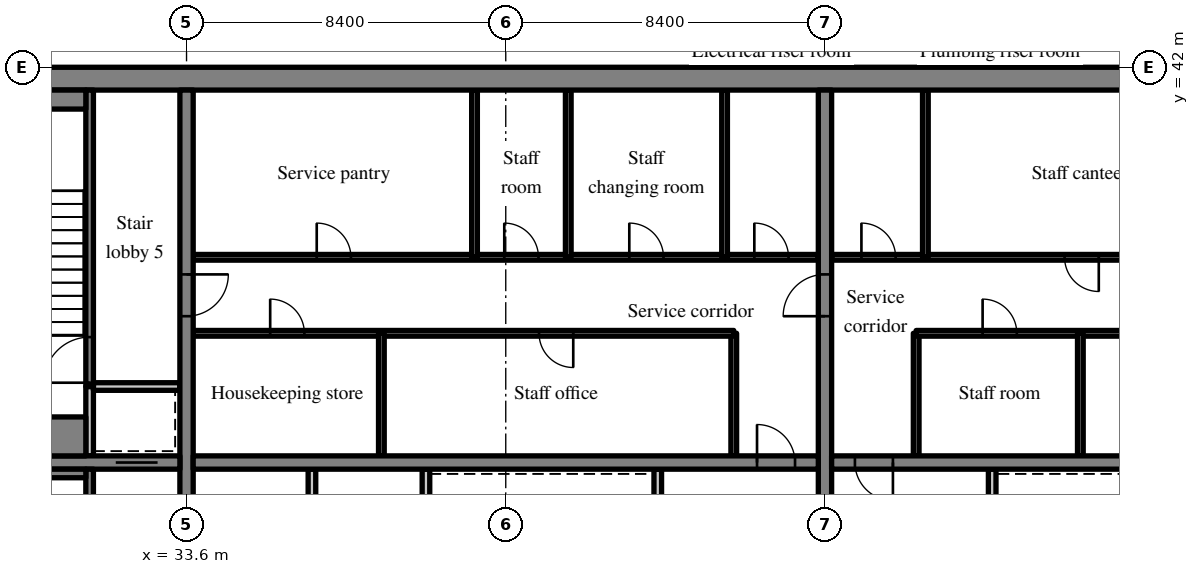
"""IFC4 building model, lengths in metres.
Left out: names, types, materials, properties, quantities, classifications, styles, units other than length and angle.
Written with IfcOpenShell. Run it as: python <this file> out.ifc"""

import sys

from ifc_helpers import new_model, si_unit, direction, frame, frame_2d, origin, place, context, subcontext, project, spatial, rectangle, extrude, source, transform, mapped, element, fill, save


model = new_model("IFC4")
c1 = context("Model", 3, precision=1e-05, world=origin(), true_north=direction((0.0, 1.0)))
c2 = subcontext(c1, "Body", "Model", "MODEL_VIEW")
j1 = project(units=[si_unit("LENGTHUNIT", "METRE"), si_unit("PLANEANGLEUNIT", "RADIAN")], contexts=[c1])
p1 = place(None, origin())
s1 = spatial("IfcSite", under=j1, at=p1, CompositionType="ELEMENT")
p2 = place(p1, origin())
s2 = spatial("IfcBuilding", under=s1, at=p2, CompositionType="ELEMENT")
p3 = place(p2, frame((0.0, 0.0, 260.8)))
s3 = spatial("IfcBuildingStorey", under=s2, at=p3, CompositionType="ELEMENT", Elevation=260.8)
m1 = source(origin(), c2, "Body", "SweptSolid", [
    extrude(rectangle(XDim=50.4, YDim=0.6, at=frame_2d((25.2, 0.0))), origin(), (0.0, 0.0, 1.0), 3.62),
])
p4 = place(p3, frame((25.2, 41.7, 0.0), z_axis=(0.0, 0.0, 1.0), x_axis=(1.0, 0.0, 0.0)))
e1 = element("IfcWall", 1, at=p4, inside=s3, PredefinedType="SHEAR", context=c2, shape_type="MappedRepresentation", body=[
    mapped(m1, transform((0.0, 0.0, 0.0), scale=1.0)),
])
m2 = source(origin(), c2, "Body", "SweptSolid", [
    extrude(rectangle(XDim=18.8, YDim=0.35, at=frame_2d((9.4, 0.0))), origin(), (0.0, 0.0, 1.0), 3.62),
])
p5 = place(p3, frame((33.6, 22.6, 0.0), z_axis=(0.0, 0.0, 1.0), x_axis=(0.0, 1.0, 0.0)))
e2 = element("IfcWall", 2, at=p5, inside=s3, PredefinedType="SHEAR", context=c2, shape_type="MappedRepresentation", body=[
    mapped(m2, transform((0.0, 0.0, 0.0), scale=1.0)),
])
m3 = source(origin(), c2, "Body", "SweptSolid", [
    extrude(rectangle(XDim=1.1, YDim=2.1, at=frame_2d((0.55, 1.05))), frame((0.0, 0.185, 0.0), z_axis=(0.0, -1.0, 0.0), x_axis=(1.0, 0.0, 0.0)), (0.0, 0.0, 1.0), 0.37),
])
p6 = place(p5, frame((12.85, 0.0, 0.0)))
e3 = element("IfcOpeningElement", 3, at=p6, cuts=e2, PredefinedType="OPENING", context=c2, shape_type="MappedRepresentation", body=[
    mapped(m3, transform((0.0, 0.0, 0.0), scale=1.0)),
])
p7 = place(p3, frame((50.4, 22.6, 0.0), z_axis=(0.0, 0.0, 1.0), x_axis=(0.0, 1.0, 0.0)))
e4 = element("IfcWall", 4, at=p7, inside=s3, PredefinedType="SHEAR", context=c2, shape_type="MappedRepresentation", body=[
    mapped(m2, transform((0.0, 0.0, 0.0), scale=1.0)),
])
p8 = place(p7, frame((12.85, 0.0, 0.0)))
e5 = element("IfcOpeningElement", 5, at=p8, cuts=e4, PredefinedType="OPENING", context=c2, shape_type="MappedRepresentation", body=[
    mapped(m3, transform((0.0, 0.0, 0.0), scale=1.0)),
])
m4 = source(origin(), c2, "Body", "SweptSolid", [
    extrude(rectangle(XDim=7.625, YDim=0.35, at=frame_2d((3.812, 0.0))), origin(), (0.0, 0.0, 1.0), 3.62),
])
p9 = place(p3, frame((25.8, 31.6, 0.0), z_axis=(0.0, 0.0, 1.0), x_axis=(1.0, 0.0, 0.0)))
e6 = element("IfcWall", 6, at=p9, inside=s3, PredefinedType="SHEAR", context=c2, shape_type="MappedRepresentation", body=[
    mapped(m4, transform((0.0, 0.0, 0.0), scale=1.0)),
])
p10 = place(p9, frame((5.938, 0.0, 0.0)))
e7 = element("IfcOpeningElement", 7, at=p10, cuts=e6, PredefinedType="OPENING", context=c2, shape_type="MappedRepresentation", body=[
    mapped(m3, transform((0.0, 0.0, 0.0), scale=1.0)),
])
m5 = source(origin(), c2, "Body", "SweptSolid", [
    extrude(rectangle(XDim=16.45, YDim=0.35, at=frame_2d((8.225, 0.0))), origin(), (0.0, 0.0, 1.0), 3.62),
])
p11 = place(p3, frame((33.775, 31.6, 0.0), z_axis=(0.0, 0.0, 1.0), x_axis=(1.0, 0.0, 0.0)))
e8 = element("IfcWall", 8, at=p11, inside=s3, PredefinedType="SHEAR", context=c2, shape_type="MappedRepresentation", body=[
    mapped(m5, transform((0.0, 0.0, 0.0), scale=1.0)),
])
m6 = source(origin(), c2, "Body", "SweptSolid", [
    extrude(rectangle(XDim=1.0, YDim=2.1, at=frame_2d((0.5, 1.05))), frame((0.0, 0.185, 0.0), z_axis=(0.0, -1.0, 0.0), x_axis=(1.0, 0.0, 0.0)), (0.0, 0.0, 1.0), 0.37),
])
p12 = place(p11, frame((14.837, 0.0, 0.0)))
e9 = element("IfcOpeningElement", 9, at=p12, cuts=e8, PredefinedType="OPENING", context=c2, shape_type="MappedRepresentation", body=[
    mapped(m6, transform((0.0, 0.0, 0.0), scale=1.0)),
])
m7 = source(origin(), c2, "Body", "SweptSolid", [
    extrude(rectangle(XDim=16.45, YDim=0.35, at=frame_2d((8.225, 0.0))), origin(), (0.0, 0.0, 1.0), 3.62),
])
p13 = place(p3, frame((50.575, 31.6, 0.0), z_axis=(0.0, 0.0, 1.0), x_axis=(1.0, 0.0, 0.0)))
e10 = element("IfcWall", 10, at=p13, inside=s3, PredefinedType="SHEAR", context=c2, shape_type="MappedRepresentation", body=[
    mapped(m7, transform((0.0, 0.0, 0.0), scale=1.0)),
])
p14 = place(p13, frame((0.613, 0.0, 0.0)))
e11 = element("IfcOpeningElement", 11, at=p14, cuts=e10, PredefinedType="OPENING", context=c2, shape_type="MappedRepresentation", body=[
    mapped(m6, transform((0.0, 0.0, 0.0), scale=1.0)),
])
m8 = source(origin(), c2, "Body", "SweptSolid", [
    extrude(rectangle(XDim=8.825, YDim=0.2, at=frame_2d((4.413, 0.0))), origin(), (0.0, 0.0, 1.0), 3.62),
])
p15 = place(p3, frame((39.9, 22.6, 0.0), z_axis=(0.0, 0.0, 1.0), x_axis=(0.0, 1.0, 0.0)))
e12 = element("IfcWall", 12, at=p15, inside=s3, PredefinedType="PARTITIONING", context=c2, shape_type="MappedRepresentation", body=[
    mapped(m8, transform((0.0, 0.0, 0.0), scale=1.0)),
])
m9 = source(origin(), c2, "Body", "SweptSolid", [
    extrude(rectangle(XDim=0.9, YDim=2.1, at=frame_2d((0.45, 1.05))), frame((0.0, 0.11, 0.0), z_axis=(0.0, -1.0, 0.0), x_axis=(1.0, 0.0, 0.0)), (0.0, 0.0, 1.0), 0.22),
])
p16 = place(p15, frame((3.95, 0.0, 0.0)))
e13 = element("IfcOpeningElement", 13, at=p16, cuts=e12, PredefinedType="OPENING", context=c2, shape_type="MappedRepresentation", body=[
    mapped(m9, transform((0.0, 0.0, 0.0), scale=1.0)),
])
m10 = source(origin(), c2, "Body", "SweptSolid", [
    extrude(rectangle(XDim=2.625, YDim=0.2, at=frame_2d((1.312, 0.0))), origin(), (0.0, 0.0, 1.0), 3.62),
])
p17 = place(p3, frame((46.0, 28.8, 0.0), z_axis=(0.0, 0.0, 1.0), x_axis=(0.0, 1.0, 0.0)))
e14 = element("IfcWall", 14, at=p17, inside=s3, PredefinedType="SOLIDWALL", context=c2, shape_type="MappedRepresentation", body=[
    mapped(m10, transform((0.0, 0.0, 0.0), scale=1.0)),
])
p18 = place(p3, frame((36.9, 22.6, 0.0), z_axis=(0.0, 0.0, 1.0), x_axis=(0.0, 1.0, 0.0)))
e15 = element("IfcWall", 15, at=p18, inside=s3, PredefinedType="PARTITIONING", context=c2, shape_type="MappedRepresentation", body=[
    mapped(m8, transform((0.0, 0.0, 0.0), scale=1.0)),
])
m11 = source(origin(), c2, "Body", "SweptSolid", [
    extrude(rectangle(XDim=3.225, YDim=0.15, at=frame_2d((1.613, 0.0))), origin(), (0.0, 0.0, 1.0), 3.62),
])
p19 = place(p3, frame((48.0, 31.775, 0.0), z_axis=(0.0, 0.0, 1.0), x_axis=(0.0, 1.0, 0.0)))
e16 = element("IfcWall", 16, at=p19, inside=s3, PredefinedType="PARTITIONING", context=c2, shape_type="MappedRepresentation", body=[
    mapped(m11, transform((0.0, 0.0, 0.0), scale=1.0)),
])
m12 = source(origin(), c2, "Body", "SweptSolid", [
    extrude(rectangle(XDim=14.225, YDim=0.15, at=frame_2d((7.113, 0.0))), origin(), (0.0, 0.0, 1.0), 3.62),
])
p20 = place(p3, frame((33.775, 35.0, 0.0), z_axis=(0.0, 0.0, 1.0), x_axis=(1.0, 0.0, 0.0)))
e17 = element("IfcWall", 17, at=p20, inside=s3, PredefinedType="PARTITIONING", context=c2, shape_type="MappedRepresentation", body=[
    mapped(m12, transform((0.0, 0.0, 0.0), scale=1.0)),
])
m13 = source(origin(), c2, "Body", "SweptSolid", [
    extrude(rectangle(XDim=0.9, YDim=2.1, at=frame_2d((0.45, 1.05))), frame((0.0, 0.085, 0.0), z_axis=(0.0, -1.0, 0.0), x_axis=(1.0, 0.0, 0.0)), (0.0, 0.0, 1.0), 0.17),
])
p21 = place(p20, frame((2.026, 0.0, 0.0)))
e18 = element("IfcOpeningElement", 18, at=p21, cuts=e17, PredefinedType="OPENING", context=c2, shape_type="MappedRepresentation", body=[
    mapped(m13, transform((0.0, 0.0, 0.0), scale=1.0)),
])
p22 = place(p20, frame((9.101, 0.0, 0.0)))
e19 = element("IfcOpeningElement", 19, at=p22, cuts=e17, PredefinedType="OPENING", context=c2, shape_type="MappedRepresentation", body=[
    mapped(m13, transform((0.0, 0.0, 0.0), scale=1.0)),
])
m14 = source(origin(), c2, "Body", "SweptSolid", [
    extrude(rectangle(XDim=16.45, YDim=0.15, at=frame_2d((8.225, 0.0))), origin(), (0.0, 0.0, 1.0), 3.62),
])
p23 = place(p3, frame((33.775, 37.0, 0.0), z_axis=(0.0, 0.0, 1.0), x_axis=(1.0, 0.0, 0.0)))
e20 = element("IfcWall", 20, at=p23, inside=s3, PredefinedType="PARTITIONING", context=c2, shape_type="MappedRepresentation", body=[
    mapped(m14, transform((0.0, 0.0, 0.0), scale=1.0)),
])
p24 = place(p23, frame((3.251, 0.0, 0.0)))
e21 = element("IfcOpeningElement", 21, at=p24, cuts=e20, PredefinedType="OPENING", context=c2, shape_type="MappedRepresentation", body=[
    mapped(m13, transform((0.0, 0.0, 0.0), scale=1.0)),
])
p25 = place(p23, frame((8.186, 0.0, 0.0)))
e22 = element("IfcOpeningElement", 22, at=p25, cuts=e20, PredefinedType="OPENING", context=c2, shape_type="MappedRepresentation", body=[
    mapped(m13, transform((0.0, 0.0, 0.0), scale=1.0)),
])
p26 = place(p23, frame((11.476, 0.0, 0.0)))
e23 = element("IfcOpeningElement", 23, at=p26, cuts=e20, PredefinedType="OPENING", context=c2, shape_type="MappedRepresentation", body=[
    mapped(m13, transform((0.0, 0.0, 0.0), scale=1.0)),
])
p27 = place(p23, frame((14.766, 0.0, 0.0)))
e24 = element("IfcOpeningElement", 24, at=p27, cuts=e20, PredefinedType="OPENING", context=c2, shape_type="MappedRepresentation", body=[
    mapped(m13, transform((0.0, 0.0, 0.0), scale=1.0)),
])
p28 = place(p3, frame((38.727, 31.775, 0.0), z_axis=(0.0, 0.0, 1.0), x_axis=(0.0, 1.0, 0.0)))
e25 = element("IfcWall", 25, at=p28, inside=s3, PredefinedType="PARTITIONING", context=c2, shape_type="MappedRepresentation", body=[
    mapped(m11, transform((0.0, 0.0, 0.0), scale=1.0)),
])
m15 = source(origin(), c2, "Body", "SweptSolid", [
    extrude(rectangle(XDim=4.4, YDim=0.15, at=frame_2d((2.2, 0.0))), origin(), (0.0, 0.0, 1.0), 3.62),
])
for number, where, z_axis, x_axis in (
    (26, (41.178, 37.0, 0.0), (0.0, 0.0, 1.0), (0.0, 1.0, 0.0)),
    (27, (43.645, 37.0, 0.0), (0.0, 0.0, 1.0), (0.0, 1.0, 0.0)),
    (28, (47.758, 37.0, 0.0), (0.0, 0.0, 1.0), (0.0, 1.0, 0.0)),
):
    element("IfcWall", number, at=place(p3, frame(where, z_axis=z_axis, x_axis=x_axis)), inside=s3, PredefinedType="PARTITIONING", context=c2, shape_type="MappedRepresentation", body=[
        mapped(m15, transform((0.0, 0.0, 0.0), scale=1.0)),
    ])
p29 = place(p3, frame((54.8, 28.8, 0.0), z_axis=(0.0, 0.0, 1.0), x_axis=(0.0, 1.0, 0.0)))
e29 = element("IfcWall", 29, at=p29, inside=s3, PredefinedType="SOLIDWALL", context=c2, shape_type="MappedRepresentation", body=[
    mapped(m10, transform((0.0, 0.0, 0.0), scale=1.0)),
])
p30 = place(p3, frame((52.8, 31.775, 0.0), z_axis=(0.0, 0.0, 1.0), x_axis=(0.0, 1.0, 0.0)))
e30 = element("IfcWall", 30, at=p30, inside=s3, PredefinedType="PARTITIONING", context=c2, shape_type="MappedRepresentation", body=[
    mapped(m11, transform((0.0, 0.0, 0.0), scale=1.0)),
])
m16 = source(origin(), c2, "Body", "SweptSolid", [
    extrude(rectangle(XDim=14.225, YDim=0.15, at=frame_2d((7.112, 0.0))), origin(), (0.0, 0.0, 1.0), 3.62),
])
p31 = place(p3, frame((67.025, 35.0, 0.0), z_axis=(0.0, 0.0, 1.0), x_axis=(-1.0, 0.0, 0.0)))
e31 = element("IfcWall", 31, at=p31, inside=s3, PredefinedType="PARTITIONING", context=c2, shape_type="MappedRepresentation", body=[
    mapped(m16, transform((0.0, 0.0, 0.0), scale=1.0)),
])
p32 = place(p31, frame((0.965, 0.0, 0.0)))
e32 = element("IfcOpeningElement", 32, at=p32, cuts=e31, PredefinedType="OPENING", context=c2, shape_type="MappedRepresentation", body=[
    mapped(m13, transform((0.0, 0.0, 0.0), scale=1.0)),
])
p33 = place(p31, frame((5.918, 0.0, 0.0)))
e33 = element("IfcOpeningElement", 33, at=p33, cuts=e31, PredefinedType="OPENING", context=c2, shape_type="MappedRepresentation", body=[
    mapped(m13, transform((0.0, 0.0, 0.0), scale=1.0)),
])
p34 = place(p31, frame((11.577, 0.0, 0.0)))
e34 = element("IfcOpeningElement", 34, at=p34, cuts=e31, PredefinedType="OPENING", context=c2, shape_type="MappedRepresentation", body=[
    mapped(m13, transform((0.0, 0.0, 0.0), scale=1.0)),
])
m17 = source(origin(), c2, "Body", "SweptSolid", [
    extrude(rectangle(XDim=16.45, YDim=0.15, at=frame_2d((8.225, 0.0))), origin(), (0.0, 0.0, 1.0), 3.62),
])
p35 = place(p3, frame((67.025, 37.0, 0.0), z_axis=(0.0, 0.0, 1.0), x_axis=(-1.0, 0.0, 0.0)))
e35 = element("IfcWall", 35, at=p35, inside=s3, PredefinedType="PARTITIONING", context=c2, shape_type="MappedRepresentation", body=[
    mapped(m17, transform((0.0, 0.0, 0.0), scale=1.0)),
])
p36 = place(p35, frame((0.784, 0.0, 0.0)))
e36 = element("IfcOpeningElement", 36, at=p36, cuts=e35, PredefinedType="OPENING", context=c2, shape_type="MappedRepresentation", body=[
    mapped(m13, transform((0.0, 0.0, 0.0), scale=1.0)),
])
p37 = place(p35, frame((3.663, 0.0, 0.0)))
e37 = element("IfcOpeningElement", 37, at=p37, cuts=e35, PredefinedType="OPENING", context=c2, shape_type="MappedRepresentation", body=[
    mapped(m13, transform((0.0, 0.0, 0.0), scale=1.0)),
])
p38 = place(p35, frame((9.42, 0.0, 0.0)))
e38 = element("IfcOpeningElement", 38, at=p38, cuts=e35, PredefinedType="OPENING", context=c2, shape_type="MappedRepresentation", body=[
    mapped(m13, transform((0.0, 0.0, 0.0), scale=1.0)),
])
p39 = place(p35, frame((14.766, 0.0, 0.0)))
e39 = element("IfcOpeningElement", 39, at=p39, cuts=e35, PredefinedType="OPENING", context=c2, shape_type="MappedRepresentation", body=[
    mapped(m13, transform((0.0, 0.0, 0.0), scale=1.0)),
])
p40 = place(p3, frame((57.12, 31.775, 0.0), z_axis=(0.0, 0.0, 1.0), x_axis=(0.0, 1.0, 0.0)))
e40 = element("IfcWall", 40, at=p40, inside=s3, PredefinedType="PARTITIONING", context=c2, shape_type="MappedRepresentation", body=[
    mapped(m11, transform((0.0, 0.0, 0.0), scale=1.0)),
])
p41 = place(p3, frame((53.042, 37.0, 0.0), z_axis=(0.0, 0.0, 1.0), x_axis=(0.0, 1.0, 0.0)))
e41 = element("IfcWall", 41, at=p41, inside=s3, PredefinedType="PARTITIONING", context=c2, shape_type="MappedRepresentation", body=[
    mapped(m15, transform((0.0, 0.0, 0.0), scale=1.0)),
])
m18 = source(origin(), c2, "Body", "SweptSolid", [
    extrude(rectangle(XDim=8.825, YDim=0.2, at=frame_2d((4.413, 0.0))), origin(), (0.0, 0.0, 1.0), 3.62),
])
p42 = place(p3, frame((31.05, 22.6, 0.0), z_axis=(0.0, 0.0, 1.0), x_axis=(0.0, 1.0, 0.0)))
e42 = element("IfcWall", 42, at=p42, inside=s3, PredefinedType="SOLIDWALL", context=c2, shape_type="MappedRepresentation", body=[
    mapped(m18, transform((0.0, 0.0, 0.0), scale=1.0)),
])
m19 = source(origin(), c2, "Body", "SweptSolid", [
    extrude(rectangle(XDim=1.2, YDim=2.1, at=frame_2d((0.6, 1.05))), frame((0.0, 0.11, 0.0), z_axis=(0.0, -1.0, 0.0), x_axis=(1.0, 0.0, 0.0)), (0.0, 0.0, 1.0), 0.22),
])
p43 = place(p42, frame((1.0, 0.0, 0.0)))
e43 = element("IfcOpeningElement", 43, at=p43, cuts=e42, PredefinedType="OPENING", context=c2, shape_type="MappedRepresentation", body=[
    mapped(m19, transform((0.0, 0.0, 0.0), scale=1.0)),
])
m20 = source(origin(), c2, "Body", "SweptSolid", [
    extrude(rectangle(XDim=1.825, YDim=0.2, at=frame_2d((0.913, 0.0))), origin(), (0.0, 0.0, 1.0), 3.62),
])
p44 = place(p3, frame((31.05, 31.775, 0.0), z_axis=(0.0, 0.0, 1.0), x_axis=(0.0, 1.0, 0.0)))
e44 = element("IfcWall", 44, at=p44, inside=s3, PredefinedType="SOLIDWALL", context=c2, shape_type="MappedRepresentation", body=[
    mapped(m20, transform((0.0, 0.0, 0.0), scale=1.0)),
])
m21 = source(origin(), c2, "Body", "SweptSolid", [
    extrude(rectangle(XDim=2.275, YDim=0.2, at=frame_2d((1.138, 0.0))), origin(), (0.0, 0.0, 1.0), 3.62),
])
p45 = place(p3, frame((31.15, 33.6, 0.0), z_axis=(0.0, 0.0, 1.0), x_axis=(1.0, 0.0, 0.0)))
e45 = element("IfcWall", 45, at=p45, inside=s3, PredefinedType="SOLIDWALL", context=c2, shape_type="MappedRepresentation", body=[
    mapped(m21, transform((0.0, 0.0, 0.0), scale=1.0)),
])
m22 = source(origin(), c2, "Body", "SweptSolid", [
    extrude(rectangle(XDim=7.8, YDim=0.2, at=frame_2d((3.9, 0.0))), origin(), (0.0, 0.0, 1.0), 3.62),
])
p46 = place(p3, frame((31.05, 33.6, 0.0), z_axis=(0.0, 0.0, 1.0), x_axis=(0.0, 1.0, 0.0)))
e46 = element("IfcWall", 46, at=p46, inside=s3, PredefinedType="SOLIDWALL", context=c2, shape_type="MappedRepresentation", body=[
    mapped(m22, transform((0.0, 0.0, 0.0), scale=1.0)),
])
p47 = place(p46, frame((0.1, 0.0, 0.0)))
e47 = element("IfcOpeningElement", 47, at=p47, cuts=e46, PredefinedType="OPENING", context=c2, shape_type="MappedRepresentation", body=[
    mapped(m19, transform((0.0, 0.0, 0.0), scale=1.0)),
])
m23 = source(origin(), c2, "Body", "SweptSolid", [
    extrude(rectangle(XDim=5.15, YDim=0.225, at=frame_2d((2.575, 0.0))), origin(), (0.0, 0.0, 1.0), 3.62),
])
p48 = place(p3, frame((25.8, 31.312, 0.0), z_axis=(0.0, 0.0, 1.0), x_axis=(1.0, 0.0, 0.0)))
e48 = element("IfcWall", 48, at=p48, inside=s3, PredefinedType="SOLIDWALL", context=c2, shape_type="MappedRepresentation", body=[
    mapped(m23, transform((0.0, 0.0, 0.0), scale=1.0)),
])
m24 = source(origin(), c2, "Body", "SweptSolid", [
    extrude(rectangle(XDim=5.15, YDim=0.5, at=frame_2d((2.575, 0.0))), origin(), (0.0, 0.0, 1.0), 3.62),
])
p49 = place(p3, frame((25.8, 41.15, 0.0), z_axis=(0.0, 0.0, 1.0), x_axis=(1.0, 0.0, 0.0)))
e49 = element("IfcWall", 49, at=p49, inside=s3, PredefinedType="SOLIDWALL", context=c2, shape_type="MappedRepresentation", body=[
    mapped(m24, transform((0.0, 0.0, 0.0), scale=1.0)),
])
m25 = source(origin(), c2, "Body", "SweptSolid", [
    extrude(rectangle(XDim=5.15, YDim=1.025, at=frame_2d((2.575, 0.0))), origin(), (0.0, 0.0, 1.0), 3.62),
])
p50 = place(p3, frame((25.8, 32.287, 0.0), z_axis=(0.0, 0.0, 1.0), x_axis=(1.0, 0.0, 0.0)))
e50 = element("IfcWall", 50, at=p50, inside=s3, PredefinedType="SOLIDWALL", context=c2, shape_type="MappedRepresentation", body=[
    mapped(m25, transform((0.0, 0.0, 0.0), scale=1.0)),
])
m26 = source(origin(), c2, "Body", "SweptSolid", [
    extrude(rectangle(XDim=1.0, YDim=2.1, at=frame_2d((0.5, 1.05))), frame((0.0, 0.025, 0.0), z_axis=(0.0, -1.0, 0.0), x_axis=(1.0, 0.0, 0.0)), (0.0, 0.0, 1.0), 0.05),
])
p51 = place(p12, origin())
e51 = element("IfcDoor", 51, at=p51, inside=s3, OperationType="SINGLE_SWING_LEFT", PredefinedType="DOOR", context=c2, shape_type="MappedRepresentation", body=[
    mapped(m26, transform((0.0, 0.0, 0.0), scale=1.0)),
])
fill(e9, e51)
m27 = source(origin(), c2, "Body", "SweptSolid", [
    extrude(rectangle(XDim=0.9, YDim=2.1, at=frame_2d((0.45, 1.05))), frame((0.0, 0.025, 0.0), z_axis=(0.0, -1.0, 0.0), x_axis=(1.0, 0.0, 0.0)), (0.0, 0.0, 1.0), 0.05),
])
p52 = place(p21, origin())
e52 = element("IfcDoor", 52, at=p52, inside=s3, OperationType="SINGLE_SWING_LEFT", PredefinedType="DOOR", context=c2, shape_type="MappedRepresentation", body=[
    mapped(m27, transform((0.0, 0.0, 0.0), scale=1.0)),
])
fill(e18, e52)
p53 = place(p22, origin())
e53 = element("IfcDoor", 53, at=p53, inside=s3, OperationType="SINGLE_SWING_RIGHT", PredefinedType="DOOR", context=c2, shape_type="MappedRepresentation", body=[
    mapped(m27, transform((0.0, 0.0, 0.0), scale=1.0)),
])
fill(e19, e53)
p54 = place(p24, origin())
e54 = element("IfcDoor", 54, at=p54, inside=s3, OperationType="SINGLE_SWING_LEFT", PredefinedType="DOOR", context=c2, shape_type="MappedRepresentation", body=[
    mapped(m27, transform((0.0, 0.0, 0.0), scale=1.0)),
])
fill(e21, e54)
p55 = place(p25, origin())
e55 = element("IfcDoor", 55, at=p55, inside=s3, OperationType="SINGLE_SWING_LEFT", PredefinedType="DOOR", context=c2, shape_type="MappedRepresentation", body=[
    mapped(m27, transform((0.0, 0.0, 0.0), scale=1.0)),
])
fill(e22, e55)
p56 = place(p26, origin())
e56 = element("IfcDoor", 56, at=p56, inside=s3, OperationType="SINGLE_SWING_LEFT", PredefinedType="DOOR", context=c2, shape_type="MappedRepresentation", body=[
    mapped(m27, transform((0.0, 0.0, 0.0), scale=1.0)),
])
fill(e23, e56)
p57 = place(p27, origin())
e57 = element("IfcDoor", 57, at=p57, inside=s3, OperationType="SINGLE_SWING_LEFT", PredefinedType="DOOR", context=c2, shape_type="MappedRepresentation", body=[
    mapped(m27, transform((0.0, 0.0, 0.0), scale=1.0)),
])
fill(e24, e57)
p58 = place(p14, origin())
e58 = element("IfcDoor", 58, at=p58, inside=s3, OperationType="SINGLE_SWING_RIGHT", PredefinedType="DOOR", context=c2, shape_type="MappedRepresentation", body=[
    mapped(m26, transform((0.0, 0.0, 0.0), scale=1.0)),
])
fill(e11, e58)
p59 = place(p34, origin())
e59 = element("IfcDoor", 59, at=p59, inside=s3, OperationType="SINGLE_SWING_RIGHT", PredefinedType="DOOR", context=c2, shape_type="MappedRepresentation", body=[
    mapped(m27, transform((0.0, 0.0, 0.0), scale=1.0)),
])
fill(e34, e59)
p60 = place(p38, origin())
e60 = element("IfcDoor", 60, at=p60, inside=s3, OperationType="SINGLE_SWING_LEFT", PredefinedType="DOOR", context=c2, shape_type="MappedRepresentation", body=[
    mapped(m27, transform((0.0, 0.0, 0.0), scale=1.0)),
])
fill(e38, e60)
p61 = place(p39, origin())
e61 = element("IfcDoor", 61, at=p61, inside=s3, OperationType="SINGLE_SWING_RIGHT", PredefinedType="DOOR", context=c2, shape_type="MappedRepresentation", body=[
    mapped(m27, transform((0.0, 0.0, 0.0), scale=1.0)),
])
fill(e39, e61)
m28 = source(origin(), c2, "Body", "SweptSolid", [
    extrude(rectangle(XDim=1.1, YDim=2.1, at=frame_2d((0.55, 1.05))), frame((0.0, 0.025, 0.0), z_axis=(0.0, -1.0, 0.0), x_axis=(1.0, 0.0, 0.0)), (0.0, 0.0, 1.0), 0.05),
])
p62 = place(p10, origin())
e62 = element("IfcDoor", 62, at=p62, inside=s3, OperationType="SLIDING_TO_LEFT", PredefinedType="DOOR", context=c2, shape_type="MappedRepresentation", body=[
    mapped(m28, transform((0.0, 0.0, 0.0), scale=1.0)),
])
fill(e7, e62)
m29 = source(origin(), c2, "Body", "SweptSolid", [
    extrude(rectangle(XDim=1.2, YDim=2.1, at=frame_2d((0.6, 1.05))), frame((0.0, 0.025, 0.0), z_axis=(0.0, -1.0, 0.0), x_axis=(1.0, 0.0, 0.0)), (0.0, 0.0, 1.0), 0.05),
])
p63 = place(p47, origin())
e63 = element("IfcDoor", 63, at=p63, inside=s3, OperationType="SINGLE_SWING_LEFT", PredefinedType="DOOR", context=c2, shape_type="MappedRepresentation", body=[
    mapped(m29, transform((0.0, 0.0, 0.0), scale=1.0)),
])
fill(e47, e63)
p64 = place(p6, origin())
e64 = element("IfcDoor", 64, at=p64, inside=s3, OperationType="SINGLE_SWING_RIGHT", PredefinedType="DOOR", context=c2, shape_type="MappedRepresentation", body=[
    mapped(m28, transform((0.0, 0.0, 0.0), scale=1.0)),
])
fill(e3, e64)
p65 = place(p8, origin())
e65 = element("IfcDoor", 65, at=p65, inside=s3, OperationType="SINGLE_SWING_LEFT", PredefinedType="DOOR", context=c2, shape_type="MappedRepresentation", body=[
    mapped(m28, transform((0.0, 0.0, 0.0), scale=1.0)),
])
fill(e5, e65)
save(model, sys.argv[1])
